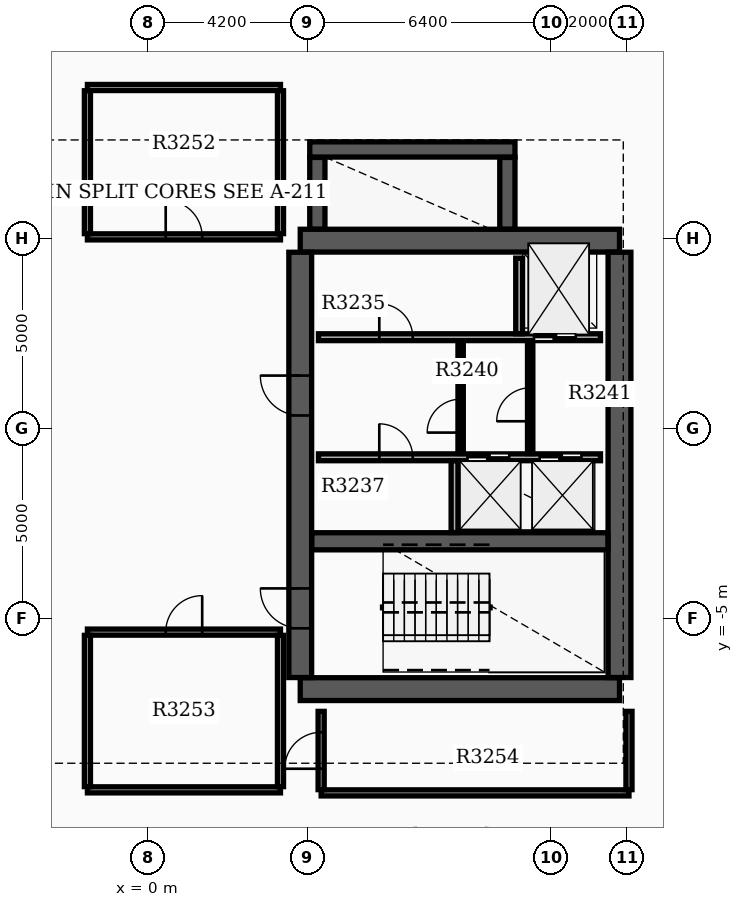
"""IFC4 building model, lengths in metres.
Left out: names, types, materials, properties, quantities, classifications, styles, units other than length and angle.
Written with IfcOpenShell. Run it as: python <this file> out.ifc"""

import sys

from ifc_helpers import new_model, si_unit, direction, frame, frame_2d, origin, place, context, subcontext, project, spatial, rectangle, extrude, element, fill, save


model = new_model("IFC4")
c1 = context("Model", 3, precision=1e-05, world=origin(), true_north=direction((0.0, 1.0)))
c2 = subcontext(c1, "Body", "Model", "MODEL_VIEW")
j1 = project(units=[si_unit("LENGTHUNIT", "METRE"), si_unit("PLANEANGLEUNIT", "RADIAN")], contexts=[c1])
p1 = place(None, origin())
s1 = spatial("IfcSite", under=j1, at=p1, CompositionType="ELEMENT")
p2 = place(p1, origin())
s2 = spatial("IfcBuilding", under=s1, at=p2, CompositionType="ELEMENT")
p3 = place(p2, frame((0.0, 0.0, 205.2)))
s3 = spatial("IfcBuildingStorey", under=s2, at=p3, CompositionType="ELEMENT", Elevation=205.2)
for number, where, z_axis, x_axis in (
    (1, (4.0, -6.85, 0.0), (0.0, 0.0, 1.0), (1.0, 0.0, 0.0)),
    (2, (4.0, 4.95, 0.0), (0.0, 0.0, 1.0), (1.0, 0.0, 0.0)),
):
    element("IfcWall", number, at=place(p3, frame(where, z_axis=z_axis, x_axis=x_axis)), inside=s3, PredefinedType="SHEAR", context=c2, shape_type="SweptSolid", body=[
        extrude(rectangle(XDim=8.4, YDim=0.6, at=frame_2d((4.2, 0.0))), origin(), (0.0, 0.0, 1.0), 3.7),
    ])
p4 = place(p3, frame((4.0, -6.545, 0.0), z_axis=(0.0, 0.0, 1.0), x_axis=(0.0, 1.0, 0.0)))
e3 = element("IfcWall", 3, at=p4, inside=s3, PredefinedType="SHEAR", context=c2, shape_type="SweptSolid", body=[
    extrude(rectangle(XDim=11.19, YDim=0.6, at=frame_2d((5.595, 0.0))), origin(), (0.0, 0.0, 1.0), 3.7),
])
p5 = place(p4, frame((1.295, 0.0, 0.0)))
e4 = element("IfcOpeningElement", 4, at=p5, cuts=e3, PredefinedType="OPENING", context=c2, shape_type="SweptSolid", body=[
    extrude(rectangle(XDim=1.05, YDim=2.15, at=frame_2d((0.525, 1.075))), frame((0.0, 0.31, 0.0), z_axis=(0.0, -1.0, 0.0), x_axis=(1.0, 0.0, 0.0)), (0.0, 0.0, 1.0), 0.62),
])
p6 = place(p4, frame((6.895, 0.0, 0.0)))
e5 = element("IfcOpeningElement", 5, at=p6, cuts=e3, PredefinedType="OPENING", context=c2, shape_type="SweptSolid", body=[
    extrude(rectangle(XDim=1.05, YDim=2.15, at=frame_2d((0.525, 1.075))), frame((0.0, 0.31, 0.0), z_axis=(0.0, -1.0, 0.0), x_axis=(1.0, 0.0, 0.0)), (0.0, 0.0, 1.0), 0.62),
])
p7 = place(p3, frame((12.4, -6.545, 0.0), z_axis=(0.0, 0.0, 1.0), x_axis=(0.0, 1.0, 0.0)))
e6 = element("IfcWall", 6, at=p7, inside=s3, PredefinedType="SHEAR", context=c2, shape_type="SweptSolid", body=[
    extrude(rectangle(XDim=11.19, YDim=0.6, at=frame_2d((5.595, 0.0))), origin(), (0.0, 0.0, 1.0), 3.7),
])
p8 = place(p3, frame((4.305, -2.96, 0.0), z_axis=(0.0, 0.0, 1.0), x_axis=(1.0, 0.0, 0.0)))
e7 = element("IfcWall", 7, at=p8, inside=s3, PredefinedType="SHEAR", context=c2, shape_type="SweptSolid", body=[
    extrude(rectangle(XDim=7.79, YDim=0.45, at=frame_2d((3.895, 0.0))), origin(), (0.0, 0.0, 1.0), 3.7),
])
p9 = place(p3, frame((4.45, 5.255, 0.0), z_axis=(0.0, 0.0, 1.0), x_axis=(0.0, 1.0, 0.0)))
e8 = element("IfcWall", 8, at=p9, inside=s3, PredefinedType="SHEAR", context=c2, shape_type="SweptSolid", body=[
    extrude(rectangle(XDim=1.885, YDim=0.4, at=frame_2d((0.942, 0.0))), origin(), (0.0, 0.0, 1.0), 3.7),
])
p10 = place(p3, frame((4.25, 7.35, 0.0), z_axis=(0.0, 0.0, 1.0), x_axis=(1.0, 0.0, 0.0)))
e9 = element("IfcWall", 9, at=p10, inside=s3, PredefinedType="SHEAR", context=c2, shape_type="SweptSolid", body=[
    extrude(rectangle(XDim=5.4, YDim=0.4, at=frame_2d((2.7, 0.0))), origin(), (0.0, 0.0, 1.0), 3.7),
])
p11 = place(p3, frame((9.45, 5.255, 0.0), z_axis=(0.0, 0.0, 1.0), x_axis=(0.0, 1.0, 0.0)))
e10 = element("IfcWall", 10, at=p11, inside=s3, PredefinedType="SHEAR", context=c2, shape_type="SweptSolid", body=[
    extrude(rectangle(XDim=1.885, YDim=0.4, at=frame_2d((0.942, 0.0))), origin(), (0.0, 0.0, 1.0), 3.7),
])
p12 = place(p3, frame((14.238, 7.721, 0.0), z_axis=(0.0, 0.0, 1.0), x_axis=(-0.078438149236, 0.996918982036, 0.0)))
e11 = element("IfcWall", 11, at=p12, inside=s3, PredefinedType="STANDARD", context=c2, shape_type="SweptSolid", body=[
    extrude(rectangle(XDim=6.86, YDim=0.28, at=frame_2d((3.43, 0.0))), origin(), (0.0, 0.0, 1.0), 3.18),
])
p13 = place(p3, frame((4.48, 2.41, 0.0), z_axis=(0.0, 0.0, 1.0), x_axis=(1.0, 0.0, 0.0)))
e12 = element("IfcWall", 12, at=p13, inside=s3, PredefinedType="SOLIDWALL", context=c2, shape_type="SweptSolid", body=[
    extrude(rectangle(XDim=7.42, YDim=0.18, at=frame_2d((3.71, 0.0))), origin(), (0.0, 0.0, 1.0), 3.17),
])
p14 = place(p13, frame((5.67, 0.0, 0.0)))
e13 = element("IfcOpeningElement", 13, at=p14, cuts=e12, PredefinedType="OPENING", context=c2, shape_type="SweptSolid", body=[
    extrude(rectangle(XDim=1.1, YDim=2.15, at=frame_2d((0.55, 1.075))), frame((0.0, 0.1, 0.0), z_axis=(0.0, -1.0, 0.0), x_axis=(1.0, 0.0, 0.0)), (0.0, 0.0, 1.0), 0.2),
])
p15 = place(p13, frame((1.6, 0.0, 0.0)))
e14 = element("IfcOpeningElement", 14, at=p15, cuts=e12, PredefinedType="OPENING", context=c2, shape_type="SweptSolid", body=[
    extrude(rectangle(XDim=0.88, YDim=2.1, at=frame_2d((0.44, 1.05))), frame((0.0, 0.1, 0.0), z_axis=(0.0, -1.0, 0.0), x_axis=(1.0, 0.0, 0.0)), (0.0, 0.0, 1.0), 0.2),
])
p16 = place(p3, frame((4.48, -0.75, 0.0), z_axis=(0.0, 0.0, 1.0), x_axis=(1.0, 0.0, 0.0)))
e15 = element("IfcWall", 15, at=p16, inside=s3, PredefinedType="SOLIDWALL", context=c2, shape_type="SweptSolid", body=[
    extrude(rectangle(XDim=7.42, YDim=0.18, at=frame_2d((3.71, 0.0))), origin(), (0.0, 0.0, 1.0), 3.17),
])
p17 = place(p16, frame((3.92, 0.0, 0.0)))
e16 = element("IfcOpeningElement", 16, at=p17, cuts=e15, PredefinedType="OPENING", context=c2, shape_type="SweptSolid", body=[
    extrude(rectangle(XDim=1.1, YDim=2.15, at=frame_2d((0.55, 1.075))), frame((0.0, 0.1, 0.0), z_axis=(0.0, -1.0, 0.0), x_axis=(1.0, 0.0, 0.0)), (0.0, 0.0, 1.0), 0.2),
])
p18 = place(p16, frame((5.82, 0.0, 0.0)))
e17 = element("IfcOpeningElement", 17, at=p18, cuts=e15, PredefinedType="OPENING", context=c2, shape_type="SweptSolid", body=[
    extrude(rectangle(XDim=1.1, YDim=2.15, at=frame_2d((0.55, 1.075))), frame((0.0, 0.1, 0.0), z_axis=(0.0, -1.0, 0.0), x_axis=(1.0, 0.0, 0.0)), (0.0, 0.0, 1.0), 0.2),
])
p19 = place(p16, frame((1.6, 0.0, 0.0)))
e18 = element("IfcOpeningElement", 18, at=p19, cuts=e15, PredefinedType="OPENING", context=c2, shape_type="SweptSolid", body=[
    extrude(rectangle(XDim=0.88, YDim=2.1, at=frame_2d((0.44, 1.05))), frame((0.0, 0.1, 0.0), z_axis=(0.0, -1.0, 0.0), x_axis=(1.0, 0.0, 0.0)), (0.0, 0.0, 1.0), 0.2),
])
p20 = place(p3, frame((9.76, 2.5, 0.0), z_axis=(0.0, 0.0, 1.0), x_axis=(0.0, 1.0, 0.0)))
e19 = element("IfcWall", 19, at=p20, inside=s3, PredefinedType="SOLIDWALL", context=c2, shape_type="SweptSolid", body=[
    extrude(rectangle(XDim=1.99, YDim=0.18, at=frame_2d((0.995, 0.0))), origin(), (0.0, 0.0, 1.0), 3.17),
])
p21 = place(p3, frame((8.06, -2.73, 0.0), z_axis=(0.0, 0.0, 1.0), x_axis=(0.0, 1.0, 0.0)))
e20 = element("IfcWall", 20, at=p21, inside=s3, PredefinedType="SOLIDWALL", context=c2, shape_type="SweptSolid", body=[
    extrude(rectangle(XDim=1.89, YDim=0.18, at=frame_2d((0.945, 0.0))), origin(), (0.0, 0.0, 1.0), 3.17),
])
p22 = place(p3, frame((8.22, -0.65, 0.0), z_axis=(0.0, 0.0, 1.0), x_axis=(0.0, 1.0, 0.0)))
e21 = element("IfcWall", 21, at=p22, inside=s3, PredefinedType="SOLIDWALL", context=c2, shape_type="SweptSolid", body=[
    extrude(rectangle(XDim=2.96, YDim=0.14, at=frame_2d((1.48, 0.0))), origin(), (0.0, 0.0, 1.0), 3.17),
])
p23 = place(p22, frame((0.55, 0.0, 0.0)))
e22 = element("IfcOpeningElement", 22, at=p23, cuts=e21, PredefinedType="OPENING", context=c2, shape_type="SweptSolid", body=[
    extrude(rectangle(XDim=0.88, YDim=2.1, at=frame_2d((0.44, 1.05))), frame((0.0, 0.08, 0.0), z_axis=(0.0, -1.0, 0.0), x_axis=(1.0, 0.0, 0.0)), (0.0, 0.0, 1.0), 0.16),
])
p24 = place(p3, frame((10.05, -0.652, 0.0), z_axis=(0.0, 0.0, 1.0), x_axis=(0.0, 1.0, 0.0)))
e23 = element("IfcWall", 23, at=p24, inside=s3, PredefinedType="PARTITIONING", context=c2, shape_type="SweptSolid", body=[
    extrude(rectangle(XDim=2.962, YDim=0.14, at=frame_2d((1.481, 0.0))), origin(), (0.0, 0.0, 1.0), 3.17),
])
p25 = place(p24, frame((0.85, 0.0, 0.0)))
e24 = element("IfcOpeningElement", 24, at=p25, cuts=e23, PredefinedType="OPENING", context=c2, shape_type="SweptSolid", body=[
    extrude(rectangle(XDim=0.88, YDim=2.1, at=frame_2d((0.44, 1.05))), frame((0.0, 0.08, 0.0), z_axis=(0.0, -1.0, 0.0), x_axis=(1.0, 0.0, 0.0)), (0.0, 0.0, 1.0), 0.16),
])
p26 = place(p3, frame((-1.6, 5.05, 0.0), z_axis=(0.0, 0.0, 1.0), x_axis=(1.0, 0.0, 0.0)))
e25 = element("IfcWall", 25, at=p26, inside=s3, PredefinedType="PARTITIONING", context=c2, shape_type="SweptSolid", body=[
    extrude(rectangle(XDim=5.08, YDim=0.16, at=frame_2d((2.54, 0.0))), origin(), (0.0, 0.0, 1.0), 3.17),
])
p27 = place(p26, frame((2.06, 0.0, 0.0)))
e26 = element("IfcOpeningElement", 26, at=p27, cuts=e25, PredefinedType="OPENING", context=c2, shape_type="SweptSolid", body=[
    extrude(rectangle(XDim=0.96, YDim=2.15, at=frame_2d((0.48, 1.075))), frame((0.0, 0.09, 0.0), z_axis=(0.0, -1.0, 0.0), x_axis=(1.0, 0.0, 0.0)), (0.0, 0.0, 1.0), 0.18),
])
p28 = place(p3, frame((-1.6, 8.98, 0.0), z_axis=(0.0, 0.0, 1.0), x_axis=(1.0, 0.0, 0.0)))
e27 = element("IfcWall", 27, at=p28, inside=s3, PredefinedType="PARTITIONING", context=c2, shape_type="SweptSolid", body=[
    extrude(rectangle(XDim=5.08, YDim=0.16, at=frame_2d((2.54, 0.0))), origin(), (0.0, 0.0, 1.0), 3.17),
])
for number, where, z_axis, x_axis in (
    (28, (-1.6, 5.135, 0.0), (0.0, 0.0, 1.0), (0.0, 1.0, 0.0)),
    (29, (3.48, 5.135, 0.0), (0.0, 0.0, 1.0), (0.0, 1.0, 0.0)),
):
    element("IfcWall", number, at=place(p3, frame(where, z_axis=z_axis, x_axis=x_axis)), inside=s3, PredefinedType="PARTITIONING", context=c2, shape_type="SweptSolid", body=[
        extrude(rectangle(XDim=3.76, YDim=0.16, at=frame_2d((1.88, 0.0))), origin(), (0.0, 0.0, 1.0), 3.17),
    ])
p29 = place(p3, frame((-1.6, -9.5, 0.0), z_axis=(0.0, 0.0, 1.0), x_axis=(1.0, 0.0, 0.0)))
e30 = element("IfcWall", 30, at=p29, inside=s3, PredefinedType="PARTITIONING", context=c2, shape_type="SweptSolid", body=[
    extrude(rectangle(XDim=5.08, YDim=0.16, at=frame_2d((2.54, 0.0))), origin(), (0.0, 0.0, 1.0), 3.17),
])
p30 = place(p3, frame((-1.6, -5.35, 0.0), z_axis=(0.0, 0.0, 1.0), x_axis=(1.0, 0.0, 0.0)))
e31 = element("IfcWall", 31, at=p30, inside=s3, PredefinedType="PARTITIONING", context=c2, shape_type="SweptSolid", body=[
    extrude(rectangle(XDim=5.08, YDim=0.16, at=frame_2d((2.54, 0.0))), origin(), (0.0, 0.0, 1.0), 3.17),
])
p31 = place(p30, frame((2.06, 0.0, 0.0)))
e32 = element("IfcOpeningElement", 32, at=p31, cuts=e31, PredefinedType="OPENING", context=c2, shape_type="SweptSolid", body=[
    extrude(rectangle(XDim=0.96, YDim=2.15, at=frame_2d((0.48, 1.075))), frame((0.0, 0.09, 0.0), z_axis=(0.0, -1.0, 0.0), x_axis=(1.0, 0.0, 0.0)), (0.0, 0.0, 1.0), 0.18),
])
for number, where, z_axis, x_axis in (
    (33, (-1.6, -9.415, 0.0), (0.0, 0.0, 1.0), (0.0, 1.0, 0.0)),
    (34, (3.48, -9.415, 0.0), (0.0, 0.0, 1.0), (0.0, 1.0, 0.0)),
):
    element("IfcWall", number, at=place(p3, frame(where, z_axis=z_axis, x_axis=x_axis)), inside=s3, PredefinedType="PARTITIONING", context=c2, shape_type="SweptSolid", body=[
        extrude(rectangle(XDim=3.98, YDim=0.16, at=frame_2d((1.99, 0.0))), origin(), (0.0, 0.0, 1.0), 3.17),
    ])
p32 = place(p3, frame((4.55, -9.58, 0.0), z_axis=(0.0, 0.0, 1.0), x_axis=(1.0, 0.0, 0.0)))
e35 = element("IfcWall", 35, at=p32, inside=s3, PredefinedType="PARTITIONING", context=c2, shape_type="SweptSolid", body=[
    extrude(rectangle(XDim=8.1, YDim=0.16, at=frame_2d((4.05, 0.0))), origin(), (0.0, 0.0, 1.0), 3.17),
])
p33 = place(p3, frame((4.55, -9.495, 0.0), z_axis=(0.0, 0.0, 1.0), x_axis=(0.0, 1.0, 0.0)))
e36 = element("IfcWall", 36, at=p33, inside=s3, PredefinedType="PARTITIONING", context=c2, shape_type="SweptSolid", body=[
    extrude(rectangle(XDim=2.06, YDim=0.16, at=frame_2d((1.03, 0.0))), origin(), (0.0, 0.0, 1.0), 3.17),
])
p34 = place(p33, frame((0.55, 0.0, 0.0)))
e37 = element("IfcOpeningElement", 37, at=p34, cuts=e36, PredefinedType="OPENING", context=c2, shape_type="SweptSolid", body=[
    extrude(rectangle(XDim=0.96, YDim=2.15, at=frame_2d((0.48, 1.075))), frame((0.0, 0.09, 0.0), z_axis=(0.0, -1.0, 0.0), x_axis=(1.0, 0.0, 0.0)), (0.0, 0.0, 1.0), 0.18),
])
p35 = place(p3, frame((12.65, -9.495, 0.0), z_axis=(0.0, 0.0, 1.0), x_axis=(0.0, 1.0, 0.0)))
e38 = element("IfcWall", 38, at=p35, inside=s3, PredefinedType="PARTITIONING", context=c2, shape_type="SweptSolid", body=[
    extrude(rectangle(XDim=2.06, YDim=0.16, at=frame_2d((1.03, 0.0))), origin(), (0.0, 0.0, 1.0), 3.17),
])
p36 = place(p5, origin())
e39 = element("IfcDoor", 39, at=p36, inside=s3, OperationType="SINGLE_SWING_RIGHT", PredefinedType="DOOR", context=c2, shape_type="SweptSolid", body=[
    extrude(rectangle(XDim=1.05, YDim=2.15, at=frame_2d((0.525, 1.075))), frame((0.0, 0.025, 0.0), z_axis=(0.0, -1.0, 0.0), x_axis=(1.0, 0.0, 0.0)), (0.0, 0.0, 1.0), 0.05),
])
fill(e4, e39)
p37 = place(p6, origin())
e40 = element("IfcDoor", 40, at=p37, inside=s3, OperationType="SINGLE_SWING_RIGHT", PredefinedType="DOOR", context=c2, shape_type="SweptSolid", body=[
    extrude(rectangle(XDim=1.05, YDim=2.15, at=frame_2d((0.525, 1.075))), frame((0.0, 0.025, 0.0), z_axis=(0.0, -1.0, 0.0), x_axis=(1.0, 0.0, 0.0)), (0.0, 0.0, 1.0), 0.05),
])
fill(e5, e40)
p38 = place(p14, origin())
e41 = element("IfcDoor", 41, at=p38, inside=s3, OperationType="DOUBLE_DOOR_SLIDING", PredefinedType="DOOR", context=c2, shape_type="SweptSolid", body=[
    extrude(rectangle(XDim=1.1, YDim=2.15, at=frame_2d((0.55, 1.075))), frame((0.0, 0.025, 0.0), z_axis=(0.0, -1.0, 0.0), x_axis=(1.0, 0.0, 0.0)), (0.0, 0.0, 1.0), 0.05),
])
fill(e13, e41)
p39 = place(p17, origin())
e42 = element("IfcDoor", 42, at=p39, inside=s3, OperationType="DOUBLE_DOOR_SLIDING", PredefinedType="DOOR", context=c2, shape_type="SweptSolid", body=[
    extrude(rectangle(XDim=1.1, YDim=2.15, at=frame_2d((0.55, 1.075))), frame((0.0, 0.025, 0.0), z_axis=(0.0, -1.0, 0.0), x_axis=(1.0, 0.0, 0.0)), (0.0, 0.0, 1.0), 0.05),
])
fill(e16, e42)
p40 = place(p18, origin())
e43 = element("IfcDoor", 43, at=p40, inside=s3, OperationType="DOUBLE_DOOR_SLIDING", PredefinedType="DOOR", context=c2, shape_type="SweptSolid", body=[
    extrude(rectangle(XDim=1.1, YDim=2.15, at=frame_2d((0.55, 1.075))), frame((0.0, 0.025, 0.0), z_axis=(0.0, -1.0, 0.0), x_axis=(1.0, 0.0, 0.0)), (0.0, 0.0, 1.0), 0.05),
])
fill(e17, e43)
p41 = place(p15, origin())
e44 = element("IfcDoor", 44, at=p41, inside=s3, OperationType="SINGLE_SWING_LEFT", PredefinedType="DOOR", context=c2, shape_type="SweptSolid", body=[
    extrude(rectangle(XDim=0.88, YDim=2.1, at=frame_2d((0.44, 1.05))), frame((0.0, 0.025, 0.0), z_axis=(0.0, -1.0, 0.0), x_axis=(1.0, 0.0, 0.0)), (0.0, 0.0, 1.0), 0.05),
])
fill(e14, e44)
p42 = place(p19, origin())
e45 = element("IfcDoor", 45, at=p42, inside=s3, OperationType="SINGLE_SWING_LEFT", PredefinedType="DOOR", context=c2, shape_type="SweptSolid", body=[
    extrude(rectangle(XDim=0.88, YDim=2.1, at=frame_2d((0.44, 1.05))), frame((0.0, 0.025, 0.0), z_axis=(0.0, -1.0, 0.0), x_axis=(1.0, 0.0, 0.0)), (0.0, 0.0, 1.0), 0.05),
])
fill(e18, e45)
p43 = place(p23, origin())
e46 = element("IfcDoor", 46, at=p43, inside=s3, OperationType="SINGLE_SWING_LEFT", PredefinedType="DOOR", context=c2, shape_type="SweptSolid", body=[
    extrude(rectangle(XDim=0.88, YDim=2.1, at=frame_2d((0.44, 1.05))), frame((0.0, 0.025, 0.0), z_axis=(0.0, -1.0, 0.0), x_axis=(1.0, 0.0, 0.0)), (0.0, 0.0, 1.0), 0.05),
])
fill(e22, e46)
p44 = place(p25, origin())
e47 = element("IfcDoor", 47, at=p44, inside=s3, OperationType="SINGLE_SWING_LEFT", PredefinedType="DOOR", context=c2, shape_type="SweptSolid", body=[
    extrude(rectangle(XDim=0.88, YDim=2.1, at=frame_2d((0.44, 1.05))), frame((0.0, 0.025, 0.0), z_axis=(0.0, -1.0, 0.0), x_axis=(1.0, 0.0, 0.0)), (0.0, 0.0, 1.0), 0.05),
])
fill(e24, e47)
p45 = place(p27, origin())
e48 = element("IfcDoor", 48, at=p45, inside=s3, OperationType="SINGLE_SWING_LEFT", PredefinedType="DOOR", context=c2, shape_type="SweptSolid", body=[
    extrude(rectangle(XDim=0.96, YDim=2.15, at=frame_2d((0.48, 1.075))), frame((0.0, 0.025, 0.0), z_axis=(0.0, -1.0, 0.0), x_axis=(1.0, 0.0, 0.0)), (0.0, 0.0, 1.0), 0.05),
])
fill(e26, e48)
p46 = place(p31, origin())
e49 = element("IfcDoor", 49, at=p46, inside=s3, OperationType="SINGLE_SWING_RIGHT", PredefinedType="DOOR", context=c2, shape_type="SweptSolid", body=[
    extrude(rectangle(XDim=0.96, YDim=2.15, at=frame_2d((0.48, 1.075))), frame((0.0, 0.025, 0.0), z_axis=(0.0, -1.0, 0.0), x_axis=(1.0, 0.0, 0.0)), (0.0, 0.0, 1.0), 0.05),
])
fill(e32, e49)
p47 = place(p34, origin())
e50 = element("IfcDoor", 50, at=p47, inside=s3, OperationType="SINGLE_SWING_LEFT", PredefinedType="DOOR", context=c2, shape_type="SweptSolid", body=[
    extrude(rectangle(XDim=0.96, YDim=2.15, at=frame_2d((0.48, 1.075))), frame((0.0, 0.025, 0.0), z_axis=(0.0, -1.0, 0.0), x_axis=(1.0, 0.0, 0.0)), (0.0, 0.0, 1.0), 0.05),
])
fill(e37, e50)
save(model, sys.argv[1])
